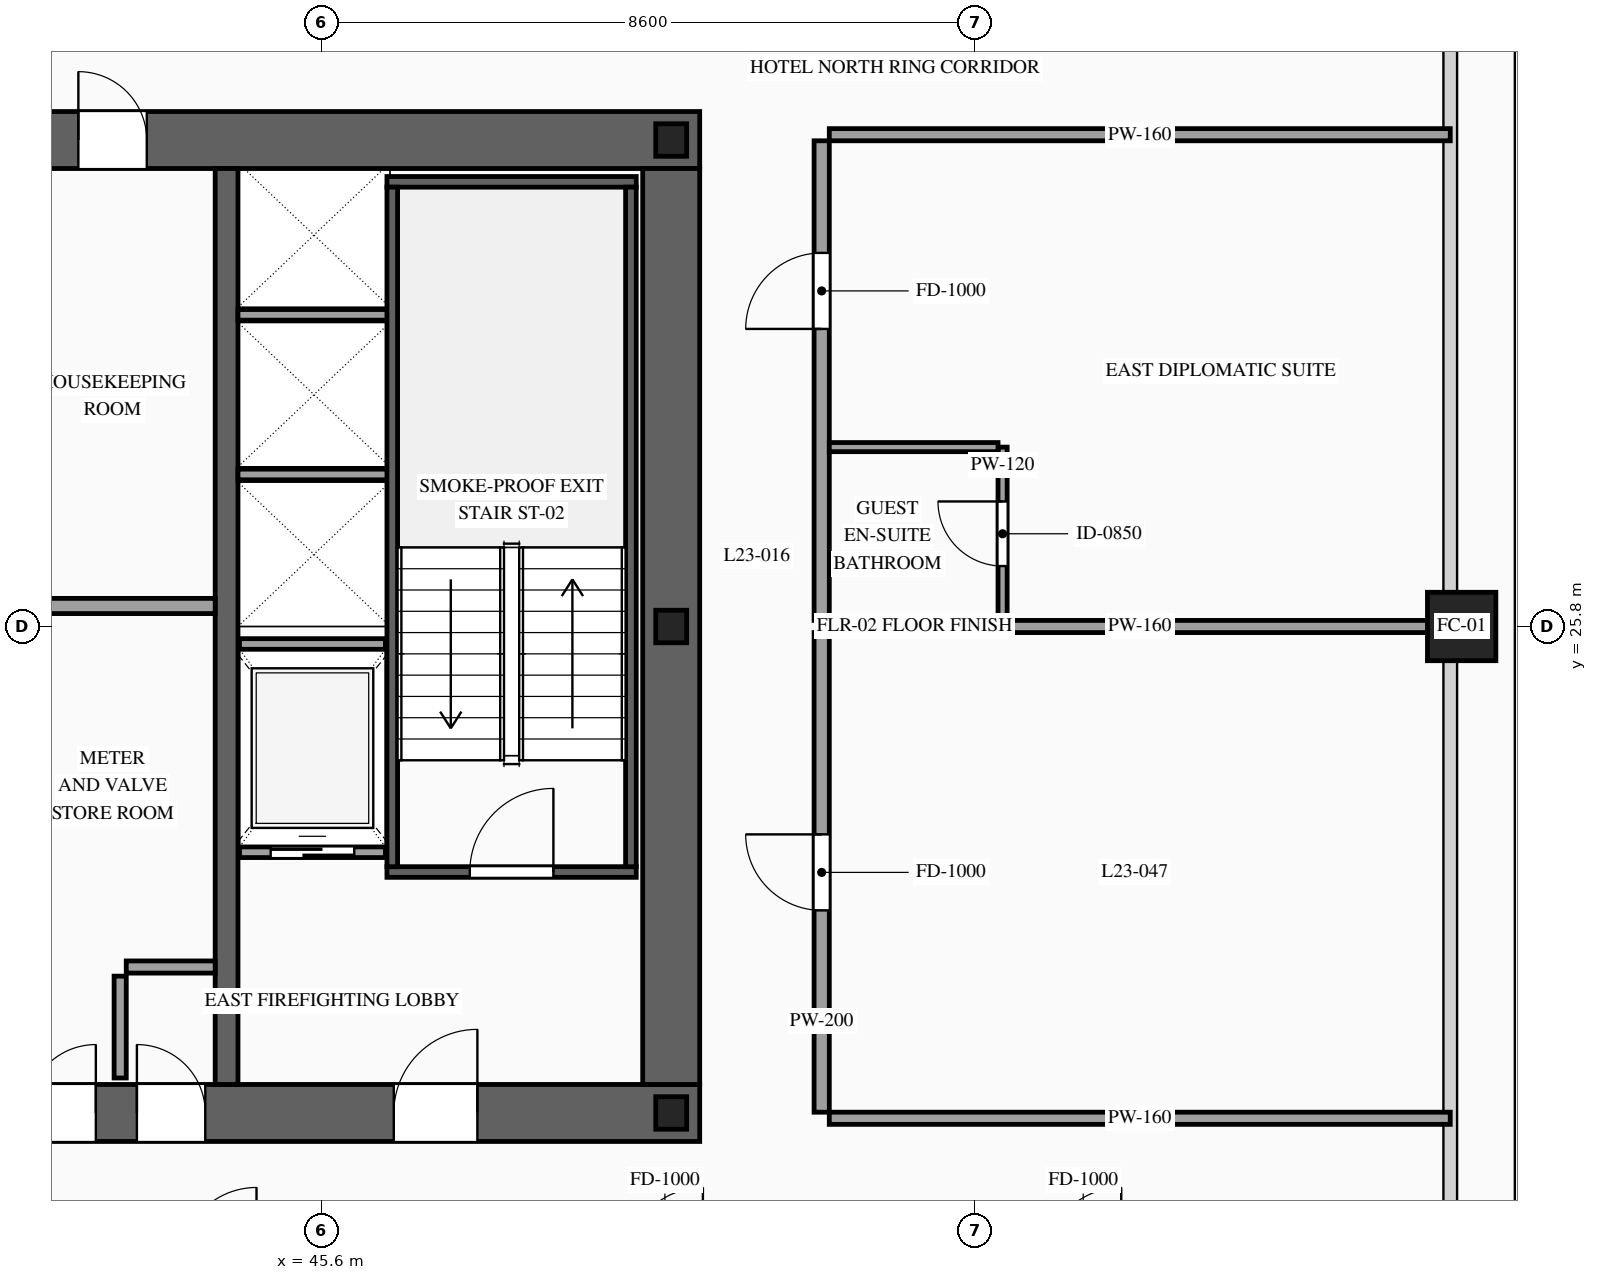
"""IFC4 building model, lengths in metres.
Left out: names, types, materials, properties, quantities, classifications, styles, units other than length and angle.
Written with IfcOpenShell. Run it as: python <this file> out.ifc"""

import sys

from ifc_helpers import new_model, si_unit, direction, frame, frame_2d, origin, origin_2d, place, context, subcontext, project, spatial, rectangle, hollow_rectangle, i_section, extrude, source, transform, mapped, element, fill, save


model = new_model("IFC4")
c1 = context("Model", 3, precision=1e-05, world=origin(), true_north=direction((0.0, 1.0)))
c2 = subcontext(c1, "Body", "Model", "MODEL_VIEW")
j1 = project(units=[si_unit("LENGTHUNIT", "METRE"), si_unit("PLANEANGLEUNIT", "RADIAN")], contexts=[c1])
p1 = place(None, origin())
s1 = spatial("IfcSite", under=j1, at=p1, CompositionType="ELEMENT")
p2 = place(p1, origin())
s2 = spatial("IfcBuilding", under=s1, at=p2, CompositionType="ELEMENT")
p3 = place(p2, frame((0.0, 0.0, 90.2)))
s3 = spatial("IfcBuildingStorey", under=s2, at=p3, CompositionType="ELEMENT", Elevation=90.2)
p4 = place(p3, frame((23.425, 19.4, 0.0), z_axis=(0.0, 0.0, 1.0), x_axis=(1.0, 0.0, 0.0)))
e1 = element("IfcWall", 1, at=p4, inside=s3, PredefinedType="SHEAR", context=c2, shape_type="SweptSolid", body=[
    extrude(rectangle(XDim=27.15, YDim=0.75, at=frame_2d((13.575, 0.0))), origin(), (0.0, 0.0, 1.0), 3.6),
])
p5 = place(p4, frame((2.025, 0.0, 0.0)))
e2 = element("IfcOpeningElement", 2, at=p5, cuts=e1, PredefinedType="OPENING", context=c2, shape_type="SweptSolid", body=[
    extrude(rectangle(XDim=1.1, YDim=2.2, at=frame_2d((0.55, 1.1))), frame((0.0, 0.39, 0.0), z_axis=(0.0, -1.0, 0.0), x_axis=(1.0, 0.0, 0.0)), (0.0, 0.0, 1.0), 0.78),
])
p6 = place(p4, frame((9.925, 0.0, 0.0)))
e3 = element("IfcOpeningElement", 3, at=p6, cuts=e1, PredefinedType="OPENING", context=c2, shape_type="SweptSolid", body=[
    extrude(rectangle(XDim=1.1, YDim=2.2, at=frame_2d((0.55, 1.1))), frame((0.0, 0.39, 0.0), z_axis=(0.0, -1.0, 0.0), x_axis=(1.0, 0.0, 0.0)), (0.0, 0.0, 1.0), 0.78),
])
p7 = place(p4, frame((23.125, 0.0, 0.0)))
e4 = element("IfcOpeningElement", 4, at=p7, cuts=e1, PredefinedType="OPENING", context=c2, shape_type="SweptSolid", body=[
    extrude(rectangle(XDim=1.1, YDim=2.2, at=frame_2d((0.55, 1.1))), frame((0.0, 0.39, 0.0), z_axis=(0.0, -1.0, 0.0), x_axis=(1.0, 0.0, 0.0)), (0.0, 0.0, 1.0), 0.78),
])
p8 = place(p4, frame((19.745, 0.0, 0.0)))
e5 = element("IfcOpeningElement", 5, at=p8, cuts=e1, PredefinedType="OPENING", context=c2, shape_type="SweptSolid", body=[
    extrude(rectangle(XDim=0.9, YDim=2.15, at=frame_2d((0.45, 1.075))), frame((0.0, 0.39, 0.0), z_axis=(0.0, -1.0, 0.0), x_axis=(1.0, 0.0, 0.0)), (0.0, 0.0, 1.0), 0.78),
])
p9 = place(p4, frame((18.305, 0.0, 0.0)))
e6 = element("IfcOpeningElement", 6, at=p9, cuts=e1, PredefinedType="OPENING", context=c2, shape_type="SweptSolid", body=[
    extrude(rectangle(XDim=0.9, YDim=2.15, at=frame_2d((0.45, 1.075))), frame((0.0, 0.39, 0.0), z_axis=(0.0, -1.0, 0.0), x_axis=(1.0, 0.0, 0.0)), (0.0, 0.0, 1.0), 0.78),
])
p10 = place(p3, frame((23.425, 32.2, 0.0), z_axis=(0.0, 0.0, 1.0), x_axis=(1.0, 0.0, 0.0)))
e7 = element("IfcWall", 7, at=p10, inside=s3, PredefinedType="SHEAR", context=c2, shape_type="SweptSolid", body=[
    extrude(rectangle(XDim=27.15, YDim=0.75, at=frame_2d((13.575, 0.0))), origin(), (0.0, 0.0, 1.0), 3.6),
])
p11 = place(p10, frame((4.645, 0.0, 0.0)))
e8 = element("IfcOpeningElement", 8, at=p11, cuts=e7, PredefinedType="OPENING", context=c2, shape_type="SweptSolid", body=[
    extrude(rectangle(XDim=0.9, YDim=2.15, at=frame_2d((0.45, 1.075))), frame((0.0, 0.39, 0.0), z_axis=(0.0, -1.0, 0.0), x_axis=(1.0, 0.0, 0.0)), (0.0, 0.0, 1.0), 0.78),
])
p12 = place(p10, frame((9.925, 0.0, 0.0)))
e9 = element("IfcOpeningElement", 9, at=p12, cuts=e7, PredefinedType="OPENING", context=c2, shape_type="SweptSolid", body=[
    extrude(rectangle(XDim=1.1, YDim=2.2, at=frame_2d((0.55, 1.1))), frame((0.0, 0.39, 0.0), z_axis=(0.0, -1.0, 0.0), x_axis=(1.0, 0.0, 0.0)), (0.0, 0.0, 1.0), 0.78),
])
p13 = place(p10, frame((15.775, 0.0, 0.0)))
e10 = element("IfcOpeningElement", 10, at=p13, cuts=e7, PredefinedType="OPENING", context=c2, shape_type="SweptSolid", body=[
    extrude(rectangle(XDim=1.1, YDim=2.2, at=frame_2d((0.55, 1.1))), frame((0.0, 0.39, 0.0), z_axis=(0.0, -1.0, 0.0), x_axis=(1.0, 0.0, 0.0)), (0.0, 0.0, 1.0), 0.78),
])
p14 = place(p10, frame((18.975, 0.0, 0.0)))
e11 = element("IfcOpeningElement", 11, at=p14, cuts=e7, PredefinedType="OPENING", context=c2, shape_type="SweptSolid", body=[
    extrude(rectangle(XDim=0.9, YDim=2.15, at=frame_2d((0.45, 1.075))), frame((0.0, 0.39, 0.0), z_axis=(0.0, -1.0, 0.0), x_axis=(1.0, 0.0, 0.0)), (0.0, 0.0, 1.0), 0.78),
])
m1 = source(origin(), c2, "Body", "SweptSolid", [
    extrude(rectangle(XDim=12.05, YDim=0.75, at=frame_2d((6.025, 0.0))), origin(), (0.0, 0.0, 1.0), 3.6),
])
p15 = place(p3, frame((50.2, 19.775, 0.0), z_axis=(0.0, 0.0, 1.0), x_axis=(0.0, 1.0, 0.0)))
e12 = element("IfcWall", 12, at=p15, inside=s3, PredefinedType="SHEAR", context=c2, shape_type="MappedRepresentation", body=[
    mapped(m1, transform((0.0, 0.0, 0.0), scale=1.0)),
])
m2 = source(origin(), c2, "Body", "SweptSolid", [
    extrude(rectangle(XDim=12.05, YDim=0.3, at=frame_2d((6.025, 0.0))), origin(), (0.0, 0.0, 1.0), 3.6),
])
p16 = place(p3, frame((44.35, 19.775, 0.0), z_axis=(0.0, 0.0, 1.0), x_axis=(0.0, 1.0, 0.0)))
e13 = element("IfcWall", 13, at=p16, inside=s3, PredefinedType="SOLIDWALL", context=c2, shape_type="MappedRepresentation", body=[
    mapped(m2, transform((0.0, 0.0, 0.0), scale=1.0)),
])
m3 = source(origin(), c2, "Body", "SweptSolid", [
    extrude(i_section(OverallWidth=0.407, OverallDepth=0.428, WebThickness=0.02, FlangeThickness=0.035, at=origin_2d()), origin(), (0.0, 0.0, 1.0), 3.6),
])
for number, where, z_axis, x_axis in (
    (14, (50.2, 19.4, 0.0), (0.0, 0.0, 1.0), (1.0, 0.0, 0.0)),
    (15, (50.2, 25.8, 0.0), (0.0, 0.0, 1.0), (1.0, 0.0, 0.0)),
    (16, (50.2, 32.2, 0.0), (0.0, 0.0, 1.0), (1.0, 0.0, 0.0)),
):
    element("IfcColumn", number, at=place(p3, frame(where, z_axis=z_axis, x_axis=x_axis)), inside=s3, PredefinedType="COLUMN", context=c2, shape_type="MappedRepresentation", body=[
        mapped(m3, transform((0.0, 0.0, 0.0), scale=1.0)),
    ])
m4 = source(origin(), c2, "Body", "SweptSolid", [
    extrude(hollow_rectangle(XDim=0.9, YDim=0.9, WallThickness=0.042, at=origin_2d()), origin(), (0.0, 0.0, 1.0), 3.6),
])
p17 = place(p3, frame((60.6, 25.8, 0.0), z_axis=(0.0, 0.0, 1.0), x_axis=(1.0, 0.0, 0.0)))
e17 = element("IfcColumn", 17, at=p17, inside=s3, PredefinedType="COLUMN", context=c2, shape_type="MappedRepresentation", body=[
    mapped(m4, transform((0.0, 0.0, 0.0), scale=1.0)),
])
p18 = place(p3, frame((44.52, 22.83, 0.0), z_axis=(0.0, 0.0, 1.0), x_axis=(1.0, 0.0, 0.0)))
e18 = element("IfcWall", 18, at=p18, inside=s3, PredefinedType="SOLIDWALL", context=c2, shape_type="SweptSolid", body=[
    extrude(rectangle(XDim=1.92, YDim=0.14, at=frame_2d((0.96, 0.0))), origin(), (0.0, 0.0, 1.0), 3.38),
])
p19 = place(p18, frame((0.41, 0.0, 0.0)))
e19 = element("IfcOpeningElement", 19, at=p19, cuts=e18, PredefinedType="OPENING", context=c2, shape_type="SweptSolid", body=[
    extrude(rectangle(XDim=1.1, YDim=2.2, at=frame_2d((0.55, 1.1))), frame((0.0, 0.085, 0.0), z_axis=(0.0, -1.0, 0.0), x_axis=(1.0, 0.0, 0.0)), (0.0, 0.0, 1.0), 0.17),
])
m5 = source(origin(), c2, "Body", "SweptSolid", [
    extrude(rectangle(XDim=1.92, YDim=0.14, at=frame_2d((0.96, 0.0))), origin(), (0.0, 0.0, 1.0), 3.38),
])
p20 = place(p3, frame((44.52, 25.57, 0.0), z_axis=(0.0, 0.0, 1.0), x_axis=(1.0, 0.0, 0.0)))
e20 = element("IfcWall", 20, at=p20, inside=s3, PredefinedType="SOLIDWALL", context=c2, shape_type="MappedRepresentation", body=[
    mapped(m5, transform((0.0, 0.0, 0.0), scale=1.0)),
])
m6 = source(origin(), c2, "Body", "SweptSolid", [
    extrude(rectangle(XDim=2.0, YDim=0.14, at=frame_2d((1.0, 0.0))), origin(), (0.0, 0.0, 1.0), 3.38),
])
for number, where, z_axis, x_axis in (
    (21, (44.5, 27.8, 0.0), (0.0, 0.0, 1.0), (1.0, 0.0, 0.0)),
    (22, (44.5, 29.9, 0.0), (0.0, 0.0, 1.0), (1.0, 0.0, 0.0)),
):
    element("IfcWall", number, at=place(p3, frame(where, z_axis=z_axis, x_axis=x_axis)), inside=s3, PredefinedType="SOLIDWALL", context=c2, shape_type="MappedRepresentation", body=[
        mapped(m6, transform((0.0, 0.0, 0.0), scale=1.0)),
    ])
p21 = place(p3, frame((46.46, 22.57, 0.0), z_axis=(0.0, 0.0, 1.0), x_axis=(1.0, 0.0, 0.0)))
e23 = element("IfcWall", 23, at=p21, inside=s3, PredefinedType="SOLIDWALL", context=c2, shape_type="SweptSolid", body=[
    extrude(rectangle(XDim=3.28, YDim=0.14, at=frame_2d((1.64, 0.0))), origin(), (0.0, 0.0, 1.0), 3.38),
])
p22 = place(p21, frame((1.09, 0.0, 0.0)))
e24 = element("IfcOpeningElement", 24, at=p22, cuts=e23, PredefinedType="OPENING", context=c2, shape_type="SweptSolid", body=[
    extrude(rectangle(XDim=1.1, YDim=2.2, at=frame_2d((0.55, 1.1))), frame((0.0, 0.085, 0.0), z_axis=(0.0, -1.0, 0.0), x_axis=(1.0, 0.0, 0.0)), (0.0, 0.0, 1.0), 0.17),
])
m7 = source(origin(), c2, "Body", "SweptSolid", [
    extrude(rectangle(XDim=3.28, YDim=0.14, at=frame_2d((1.64, 0.0))), origin(), (0.0, 0.0, 1.0), 3.38),
])
p23 = place(p3, frame((46.46, 31.65, 0.0), z_axis=(0.0, 0.0, 1.0), x_axis=(1.0, 0.0, 0.0)))
e25 = element("IfcWall", 25, at=p23, inside=s3, PredefinedType="SOLIDWALL", context=c2, shape_type="MappedRepresentation", body=[
    mapped(m7, transform((0.0, 0.0, 0.0), scale=1.0)),
])
m8 = source(origin(), c2, "Body", "SweptSolid", [
    extrude(rectangle(XDim=8.94, YDim=0.14, at=frame_2d((4.47, 0.0))), origin(), (0.0, 0.0, 1.0), 3.38),
])
for number, where, z_axis, x_axis in (
    (26, (46.53, 22.64, 0.0), (0.0, 0.0, 1.0), (0.0, 1.0, 0.0)),
    (27, (49.67, 22.64, 0.0), (0.0, 0.0, 1.0), (0.0, 1.0, 0.0)),
):
    element("IfcWall", number, at=place(p3, frame(where, z_axis=z_axis, x_axis=x_axis)), inside=s3, PredefinedType="SOLIDWALL", context=c2, shape_type="MappedRepresentation", body=[
        mapped(m8, transform((0.0, 0.0, 0.0), scale=1.0)),
    ])
m9 = source(origin(), c2, "Body", "SweptSolid", [
    extrude(rectangle(XDim=1.34, YDim=0.16, at=frame_2d((0.67, 0.0))), origin(), (0.0, 0.0, 1.0), 3.38),
])
p24 = place(p3, frame((42.95, 19.86, 0.0), z_axis=(0.0, 0.0, 1.0), x_axis=(0.0, 1.0, 0.0)))
e28 = element("IfcWall", 28, at=p24, inside=s3, PredefinedType="PARTITIONING", context=c2, shape_type="MappedRepresentation", body=[
    mapped(m9, transform((0.0, 0.0, 0.0), scale=1.0)),
])
m10 = source(origin(), c2, "Body", "SweptSolid", [
    extrude(rectangle(XDim=1.17, YDim=0.16, at=frame_2d((0.585, 0.0))), origin(), (0.0, 0.0, 1.0), 3.38),
])
p25 = place(p3, frame((43.03, 21.32, 0.0), z_axis=(0.0, 0.0, 1.0), x_axis=(1.0, 0.0, 0.0)))
e29 = element("IfcWall", 29, at=p25, inside=s3, PredefinedType="PARTITIONING", context=c2, shape_type="MappedRepresentation", body=[
    mapped(m10, transform((0.0, 0.0, 0.0), scale=1.0)),
])
m11 = source(origin(), c2, "Body", "SweptSolid", [
    extrude(rectangle(XDim=2.7, YDim=0.2, at=frame_2d((1.35, 0.0))), origin(), (0.0, 0.0, 1.0), 3.38),
])
p26 = place(p3, frame((41.5, 26.07, 0.0), z_axis=(0.0, 0.0, 1.0), x_axis=(1.0, 0.0, 0.0)))
e30 = element("IfcWall", 30, at=p26, inside=s3, PredefinedType="PARTITIONING", context=c2, shape_type="MappedRepresentation", body=[
    mapped(m11, transform((0.0, 0.0, 0.0), scale=1.0)),
])
p27 = place(p3, frame((52.18, 19.41, 0.0), z_axis=(0.0, 0.0, 1.0), x_axis=(0.0, 1.0, 0.0)))
e31 = element("IfcWall", 31, at=p27, inside=s3, PredefinedType="PARTITIONING", context=c2, shape_type="SweptSolid", body=[
    extrude(rectangle(XDim=6.31, YDim=0.2, at=frame_2d((3.155, 0.0))), origin(), (0.0, 0.0, 1.0), 3.38),
])
p28 = place(p27, frame((2.655, 0.0, 0.0)))
e32 = element("IfcOpeningElement", 32, at=p28, cuts=e31, PredefinedType="OPENING", context=c2, shape_type="SweptSolid", body=[
    extrude(rectangle(XDim=1.0, YDim=2.2, at=frame_2d((0.5, 1.1))), frame((0.0, 0.115, 0.0), z_axis=(0.0, -1.0, 0.0), x_axis=(1.0, 0.0, 0.0)), (0.0, 0.0, 1.0), 0.23),
])
m12 = source(origin(), c2, "Body", "SweptSolid", [
    extrude(rectangle(XDim=8.17, YDim=0.16, at=frame_2d((4.085, 0.0))), origin(), (0.0, 0.0, 1.0), 2.675),
])
p29 = place(p3, frame((52.28, 25.8, 0.0), z_axis=(0.0, 0.0, 1.0), x_axis=(1.0, 0.0, 0.0)))
e33 = element("IfcWall", 33, at=p29, inside=s3, PredefinedType="PARTITIONING", context=c2, shape_type="MappedRepresentation", body=[
    mapped(m12, transform((0.0, 0.0, 0.0), scale=1.0)),
])
m13 = source(origin(), c2, "Body", "SweptSolid", [
    extrude(rectangle(XDim=8.17, YDim=0.16, at=frame_2d((4.085, 0.0))), origin(), (0.0, 0.0, 1.0), 2.875),
])
p30 = place(p3, frame((52.28, 19.33, 0.0), z_axis=(0.0, 0.0, 1.0), x_axis=(1.0, 0.0, 0.0)))
e34 = element("IfcWall", 34, at=p30, inside=s3, PredefinedType="PARTITIONING", context=c2, shape_type="MappedRepresentation", body=[
    mapped(m13, transform((0.0, 0.0, 0.0), scale=1.0)),
])
p31 = place(p3, frame((52.18, 25.88, 0.0), z_axis=(0.0, 0.0, 1.0), x_axis=(0.0, 1.0, 0.0)))
e35 = element("IfcWall", 35, at=p31, inside=s3, PredefinedType="PARTITIONING", context=c2, shape_type="SweptSolid", body=[
    extrude(rectangle(XDim=6.31, YDim=0.2, at=frame_2d((3.155, 0.0))), origin(), (0.0, 0.0, 1.0), 3.38),
])
p32 = place(p31, frame((3.835, 0.0, 0.0)))
e36 = element("IfcOpeningElement", 36, at=p32, cuts=e35, PredefinedType="OPENING", context=c2, shape_type="SweptSolid", body=[
    extrude(rectangle(XDim=1.0, YDim=2.2, at=frame_2d((0.5, 1.1))), frame((0.0, 0.115, 0.0), z_axis=(0.0, -1.0, 0.0), x_axis=(1.0, 0.0, 0.0)), (0.0, 0.0, 1.0), 0.23),
])
p33 = place(p3, frame((52.28, 32.27, 0.0), z_axis=(0.0, 0.0, 1.0), x_axis=(1.0, 0.0, 0.0)))
e37 = element("IfcWall", 37, at=p33, inside=s3, PredefinedType="PARTITIONING", context=c2, shape_type="MappedRepresentation", body=[
    mapped(m13, transform((0.0, 0.0, 0.0), scale=1.0)),
])
p34 = place(p3, frame((54.56, 25.88, 0.0), z_axis=(0.0, 0.0, 1.0), x_axis=(0.0, 1.0, 0.0)))
e38 = element("IfcWall", 38, at=p34, inside=s3, PredefinedType="PARTITIONING", context=c2, shape_type="SweptSolid", body=[
    extrude(rectangle(XDim=2.28, YDim=0.12, at=frame_2d((1.14, 0.0))), origin(), (0.0, 0.0, 1.0), 3.38),
])
p35 = place(p34, frame((0.715, 0.0, 0.0)))
e39 = element("IfcOpeningElement", 39, at=p35, cuts=e38, PredefinedType="OPENING", context=c2, shape_type="SweptSolid", body=[
    extrude(rectangle(XDim=0.85, YDim=2.1, at=frame_2d((0.425, 1.05))), frame((0.0, 0.075, 0.0), z_axis=(0.0, -1.0, 0.0), x_axis=(1.0, 0.0, 0.0)), (0.0, 0.0, 1.0), 0.15),
])
m14 = source(origin(), c2, "Body", "SweptSolid", [
    extrude(rectangle(XDim=2.22, YDim=0.12, at=frame_2d((1.11, 0.0))), origin(), (0.0, 0.0, 1.0), 3.38),
])
p36 = place(p3, frame((52.28, 28.16, 0.0), z_axis=(0.0, 0.0, 1.0), x_axis=(1.0, 0.0, 0.0)))
e40 = element("IfcWall", 40, at=p36, inside=s3, PredefinedType="PARTITIONING", context=c2, shape_type="MappedRepresentation", body=[
    mapped(m14, transform((0.0, 0.0, 0.0), scale=1.0)),
])
m15 = source(origin(), c2, "Body", "SweptSolid", [
    extrude(rectangle(XDim=1.1, YDim=2.2, at=frame_2d((0.55, 1.1))), frame((0.0, 0.025, 0.0), z_axis=(0.0, -1.0, 0.0), x_axis=(1.0, 0.0, 0.0)), (0.0, 0.0, 1.0), 0.05),
])
p37 = place(p19, origin())
e41 = element("IfcDoor", 41, at=p37, inside=s3, OperationType="SLIDING_TO_RIGHT", PredefinedType="DOOR", context=c2, shape_type="MappedRepresentation", body=[
    mapped(m15, transform((0.0, 0.0, 0.0), scale=1.0)),
])
fill(e19, e41)
m16 = source(origin(), c2, "Body", "SweptSolid", [
    extrude(rectangle(XDim=1.1, YDim=2.2, at=frame_2d((0.55, 1.1))), frame((0.0, 0.025, 0.0), z_axis=(0.0, -1.0, 0.0), x_axis=(1.0, 0.0, 0.0)), (0.0, 0.0, 1.0), 0.05),
])
p38 = place(p22, origin())
e42 = element("IfcDoor", 42, at=p38, inside=s3, OperationType="SINGLE_SWING_RIGHT", PredefinedType="DOOR", context=c2, shape_type="MappedRepresentation", body=[
    mapped(m16, transform((0.0, 0.0, 0.0), scale=1.0)),
])
fill(e24, e42)
p39 = place(p7, origin())
e43 = element("IfcDoor", 43, at=p39, inside=s3, OperationType="SINGLE_SWING_RIGHT", PredefinedType="DOOR", context=c2, shape_type="MappedRepresentation", body=[
    mapped(m16, transform((0.0, 0.0, 0.0), scale=1.0)),
])
fill(e4, e43)
m17 = source(origin(), c2, "Body", "SweptSolid", [
    extrude(rectangle(XDim=0.9, YDim=2.15, at=frame_2d((0.45, 1.075))), frame((0.0, 0.025, 0.0), z_axis=(0.0, -1.0, 0.0), x_axis=(1.0, 0.0, 0.0)), (0.0, 0.0, 1.0), 0.05),
])
p40 = place(p8, origin())
e44 = element("IfcDoor", 44, at=p40, inside=s3, OperationType="SINGLE_SWING_LEFT", PredefinedType="DOOR", context=c2, shape_type="MappedRepresentation", body=[
    mapped(m17, transform((0.0, 0.0, 0.0), scale=1.0)),
])
fill(e5, e44)
p41 = place(p9, origin())
e45 = element("IfcDoor", 45, at=p41, inside=s3, OperationType="SINGLE_SWING_RIGHT", PredefinedType="DOOR", context=c2, shape_type="MappedRepresentation", body=[
    mapped(m17, transform((0.0, 0.0, 0.0), scale=1.0)),
])
fill(e6, e45)
p42 = place(p14, origin())
e46 = element("IfcDoor", 46, at=p42, inside=s3, OperationType="SINGLE_SWING_LEFT", PredefinedType="DOOR", context=c2, shape_type="MappedRepresentation", body=[
    mapped(m17, transform((0.0, 0.0, 0.0), scale=1.0)),
])
fill(e11, e46)
m18 = source(origin(), c2, "Body", "SweptSolid", [
    extrude(rectangle(XDim=1.0, YDim=2.2, at=frame_2d((0.5, 1.1))), frame((0.0, 0.025, 0.0), z_axis=(0.0, -1.0, 0.0), x_axis=(1.0, 0.0, 0.0)), (0.0, 0.0, 1.0), 0.05),
])
p43 = place(p28, origin())
e47 = element("IfcDoor", 47, at=p43, inside=s3, OperationType="SINGLE_SWING_RIGHT", PredefinedType="DOOR", context=c2, shape_type="MappedRepresentation", body=[
    mapped(m18, transform((0.0, 0.0, 0.0), scale=1.0)),
])
fill(e32, e47)
p44 = place(p32, origin())
e48 = element("IfcDoor", 48, at=p44, inside=s3, OperationType="SINGLE_SWING_LEFT", PredefinedType="DOOR", context=c2, shape_type="MappedRepresentation", body=[
    mapped(m18, transform((0.0, 0.0, 0.0), scale=1.0)),
])
fill(e36, e48)
m19 = source(origin(), c2, "Body", "SweptSolid", [
    extrude(rectangle(XDim=0.85, YDim=2.1, at=frame_2d((0.425, 1.05))), frame((0.0, 0.025, 0.0), z_axis=(0.0, -1.0, 0.0), x_axis=(1.0, 0.0, 0.0)), (0.0, 0.0, 1.0), 0.05),
])
p45 = place(p35, origin())
e49 = element("IfcDoor", 49, at=p45, inside=s3, OperationType="SINGLE_SWING_RIGHT", PredefinedType="DOOR", context=c2, shape_type="MappedRepresentation", body=[
    mapped(m19, transform((0.0, 0.0, 0.0), scale=1.0)),
])
fill(e39, e49)
save(model, sys.argv[1])
